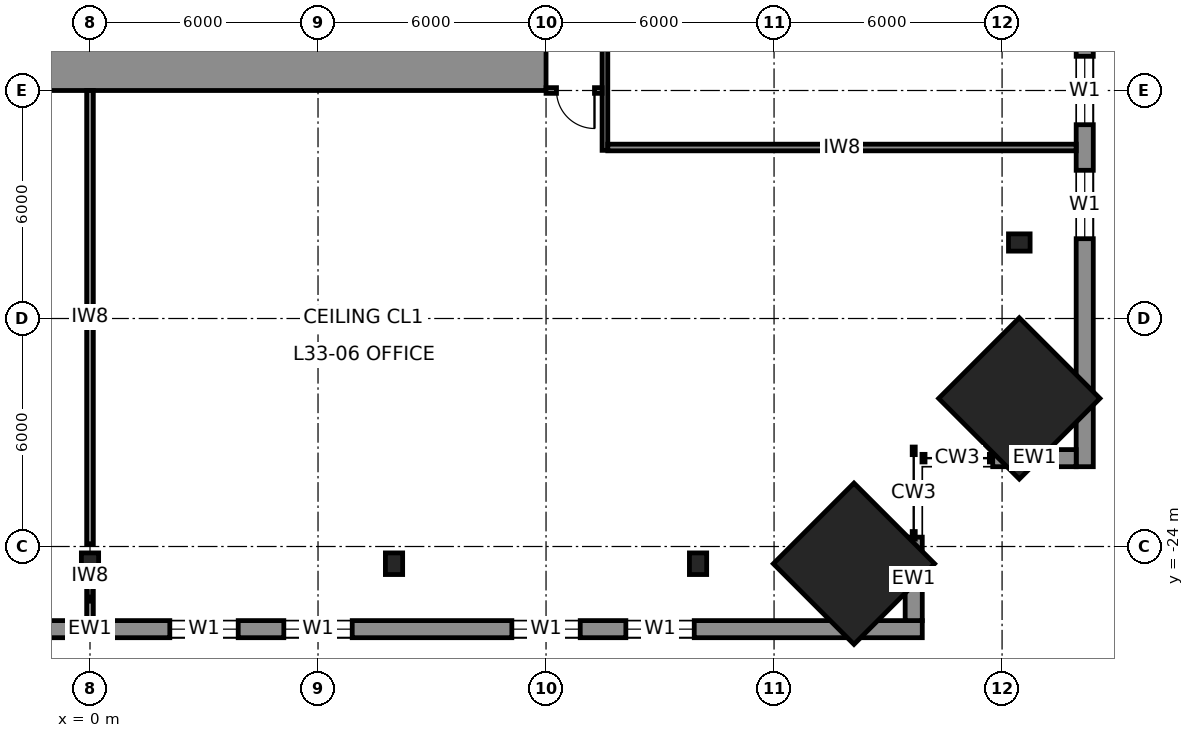
"""IFC4 building model, lengths in metres.
Left out: names, types, materials, properties, quantities, classifications, styles, units other than length and angle.
Written with IfcOpenShell. Run it as: python <this file> out.ifc"""

import sys

from ifc_helpers import new_model, si_unit, direction, frame, frame_2d, origin, origin_2d, place, context, subcontext, project, spatial, rectangle, i_section, extrude, element, fill, save


model = new_model("IFC4")
c1 = context("Model", 3, precision=1e-05, world=origin(), true_north=direction((0.0, 1.0)))
c2 = subcontext(c1, "Body", "Model", "MODEL_VIEW")
j1 = project(units=[si_unit("LENGTHUNIT", "METRE"), si_unit("PLANEANGLEUNIT", "RADIAN")], contexts=[c1])
p1 = place(None, origin())
s1 = spatial("IfcSite", under=j1, at=p1, CompositionType="ELEMENT")
p2 = place(p1, origin())
s2 = spatial("IfcBuilding", under=s1, at=p2, CompositionType="ELEMENT")
p3 = place(p2, frame((0.0, 0.0, 159.8)))
s3 = spatial("IfcBuildingStorey", under=s2, at=p3, CompositionType="ELEMENT", Elevation=159.8)
for number, where, z_axis, x_axis in (
    (1, (24.453, -20.103, 0.0), (-0.04, 0.04, 0.998), (-0.708, -0.707, 0.0)),
    (2, (20.103, -24.453, 0.0), (-0.04, 0.04, 0.998), (-0.707, -0.708, 0.0)),
):
    element("IfcColumn", number, at=place(p3, frame(where, z_axis=z_axis, x_axis=x_axis)), inside=s3, PredefinedType="COLUMN", context=c2, shape_type="SweptSolid", body=[
        extrude(rectangle(XDim=3.0, YDim=3.0, at=origin_2d()), origin(), (0.0, 0.0, 1.0), 4.007),
    ])
for number, where, z_axis, x_axis in (
    (3, (24.453, -16.0, 0.0), (-0.04, 0.0, 0.999), (0.0, -1.0, 0.0)),
    (4, (0.0, -24.453, 0.0), (0.0, 0.04, 0.999), (-1.0, 0.0, 0.0)),
    (5, (8.0, -24.453, 0.0), (0.0, 0.04, 0.999), (-1.0, 0.0, 0.0)),
    (6, (16.0, -24.453, 0.0), (0.0, 0.04, 0.999), (-1.0, 0.0, 0.0)),
):
    element("IfcColumn", number, at=place(p3, frame(where, z_axis=z_axis, x_axis=x_axis)), inside=s3, PredefinedType="COLUMN", context=c2, shape_type="SweptSolid", body=[
        extrude(i_section(OverallWidth=0.454, OverallDepth=0.569, WebThickness=0.078, FlangeThickness=0.125, at=origin_2d()), origin(), (0.0, 0.0, 1.0), 4.003),
    ])
p4 = place(p3, frame((12.0, -11.25, 0.0), z_axis=(0.0, 0.0, 1.0), x_axis=(-1.0, 0.0, 0.0)))
e7 = element("IfcWall", 7, at=p4, inside=s3, PredefinedType="SHEAR", context=c2, shape_type="SweptSolid", body=[
    extrude(rectangle(XDim=24.0, YDim=1.5, at=frame_2d((12.0, 0.0))), origin(), (0.0, 0.0, 1.0), 4.0),
])
p5 = place(p3, frame((26.175, -21.9, 0.0), z_axis=(0.0, 0.0, 1.0), x_axis=(0.0, 1.0, 0.0)))
e8 = element("IfcWall", 8, at=p5, inside=s3, PredefinedType="SOLIDWALL", context=c2, shape_type="SweptSolid", body=[
    extrude(rectangle(XDim=43.8, YDim=0.45, at=frame_2d((21.9, 0.0))), origin(), (0.0, 0.0, 1.0), 3.83),
])
p6 = place(p5, frame((6.0, 0.0, 0.7)))
e9 = element("IfcOpeningElement", 9, at=p6, cuts=e8, PredefinedType="OPENING", context=c2, shape_type="SweptSolid", body=[
    extrude(rectangle(XDim=1.8, YDim=2.6, at=frame_2d((0.9, 1.3))), frame((0.0, 0.235, 0.0), z_axis=(0.0, -1.0, 0.0), x_axis=(1.0, 0.0, 0.0)), (0.0, 0.0, 1.0), 0.47),
])
p7 = place(p5, frame((9.0, 0.0, 0.7)))
e10 = element("IfcOpeningElement", 10, at=p7, cuts=e8, PredefinedType="OPENING", context=c2, shape_type="SweptSolid", body=[
    extrude(rectangle(XDim=1.8, YDim=2.6, at=frame_2d((0.9, 1.3))), frame((0.0, 0.235, 0.0), z_axis=(0.0, -1.0, 0.0), x_axis=(1.0, 0.0, 0.0)), (0.0, 0.0, 1.0), 0.47),
])
p8 = place(p5, frame((15.0, 0.0, 0.7)))
e11 = element("IfcOpeningElement", 11, at=p8, cuts=e8, PredefinedType="OPENING", context=c2, shape_type="SweptSolid", body=[
    extrude(rectangle(XDim=1.8, YDim=2.6, at=frame_2d((0.9, 1.3))), frame((0.0, 0.235, 0.0), z_axis=(0.0, -1.0, 0.0), x_axis=(1.0, 0.0, 0.0)), (0.0, 0.0, 1.0), 0.47),
])
p9 = place(p5, frame((18.0, 0.0, 0.7)))
e12 = element("IfcOpeningElement", 12, at=p9, cuts=e8, PredefinedType="OPENING", context=c2, shape_type="SweptSolid", body=[
    extrude(rectangle(XDim=1.8, YDim=2.6, at=frame_2d((0.9, 1.3))), frame((0.0, 0.235, 0.0), z_axis=(0.0, -1.0, 0.0), x_axis=(1.0, 0.0, 0.0)), (0.0, 0.0, 1.0), 0.47),
])
p10 = place(p5, frame((24.0, 0.0, 0.7)))
e13 = element("IfcOpeningElement", 13, at=p10, cuts=e8, PredefinedType="OPENING", context=c2, shape_type="SweptSolid", body=[
    extrude(rectangle(XDim=1.8, YDim=2.6, at=frame_2d((0.9, 1.3))), frame((0.0, 0.235, 0.0), z_axis=(0.0, -1.0, 0.0), x_axis=(1.0, 0.0, 0.0)), (0.0, 0.0, 1.0), 0.47),
])
p11 = place(p5, frame((27.0, 0.0, 0.7)))
e14 = element("IfcOpeningElement", 14, at=p11, cuts=e8, PredefinedType="OPENING", context=c2, shape_type="SweptSolid", body=[
    extrude(rectangle(XDim=1.8, YDim=2.6, at=frame_2d((0.9, 1.3))), frame((0.0, 0.235, 0.0), z_axis=(0.0, -1.0, 0.0), x_axis=(1.0, 0.0, 0.0)), (0.0, 0.0, 1.0), 0.47),
])
p12 = place(p5, frame((33.0, 0.0, 0.7)))
e15 = element("IfcOpeningElement", 15, at=p12, cuts=e8, PredefinedType="OPENING", context=c2, shape_type="SweptSolid", body=[
    extrude(rectangle(XDim=1.8, YDim=2.6, at=frame_2d((0.9, 1.3))), frame((0.0, 0.235, 0.0), z_axis=(0.0, -1.0, 0.0), x_axis=(1.0, 0.0, 0.0)), (0.0, 0.0, 1.0), 0.47),
])
p13 = place(p5, frame((36.0, 0.0, 0.7)))
e16 = element("IfcOpeningElement", 16, at=p13, cuts=e8, PredefinedType="OPENING", context=c2, shape_type="SweptSolid", body=[
    extrude(rectangle(XDim=1.8, YDim=2.6, at=frame_2d((0.9, 1.3))), frame((0.0, 0.235, 0.0), z_axis=(0.0, -1.0, 0.0), x_axis=(1.0, 0.0, 0.0)), (0.0, 0.0, 1.0), 0.47),
])
p14 = place(p3, frame((-21.9, -26.175, 0.0), z_axis=(0.0, 0.0, 1.0), x_axis=(1.0, 0.0, 0.0)))
e17 = element("IfcWall", 17, at=p14, inside=s3, PredefinedType="SOLIDWALL", context=c2, shape_type="SweptSolid", body=[
    extrude(rectangle(XDim=43.8, YDim=0.45, at=frame_2d((21.9, 0.0))), origin(), (0.0, 0.0, 1.0), 3.83),
])
p15 = place(p14, frame((6.0, 0.0, 0.7)))
e18 = element("IfcOpeningElement", 18, at=p15, cuts=e17, PredefinedType="OPENING", context=c2, shape_type="SweptSolid", body=[
    extrude(rectangle(XDim=1.8, YDim=2.6, at=frame_2d((0.9, 1.3))), frame((0.0, 0.235, 0.0), z_axis=(0.0, -1.0, 0.0), x_axis=(1.0, 0.0, 0.0)), (0.0, 0.0, 1.0), 0.47),
])
p16 = place(p14, frame((9.0, 0.0, 0.7)))
e19 = element("IfcOpeningElement", 19, at=p16, cuts=e17, PredefinedType="OPENING", context=c2, shape_type="SweptSolid", body=[
    extrude(rectangle(XDim=1.8, YDim=2.6, at=frame_2d((0.9, 1.3))), frame((0.0, 0.235, 0.0), z_axis=(0.0, -1.0, 0.0), x_axis=(1.0, 0.0, 0.0)), (0.0, 0.0, 1.0), 0.47),
])
p17 = place(p14, frame((15.0, 0.0, 0.7)))
e20 = element("IfcOpeningElement", 20, at=p17, cuts=e17, PredefinedType="OPENING", context=c2, shape_type="SweptSolid", body=[
    extrude(rectangle(XDim=1.8, YDim=2.6, at=frame_2d((0.9, 1.3))), frame((0.0, 0.235, 0.0), z_axis=(0.0, -1.0, 0.0), x_axis=(1.0, 0.0, 0.0)), (0.0, 0.0, 1.0), 0.47),
])
p18 = place(p14, frame((18.0, 0.0, 0.7)))
e21 = element("IfcOpeningElement", 21, at=p18, cuts=e17, PredefinedType="OPENING", context=c2, shape_type="SweptSolid", body=[
    extrude(rectangle(XDim=1.8, YDim=2.6, at=frame_2d((0.9, 1.3))), frame((0.0, 0.235, 0.0), z_axis=(0.0, -1.0, 0.0), x_axis=(1.0, 0.0, 0.0)), (0.0, 0.0, 1.0), 0.47),
])
p19 = place(p14, frame((24.0, 0.0, 0.7)))
e22 = element("IfcOpeningElement", 22, at=p19, cuts=e17, PredefinedType="OPENING", context=c2, shape_type="SweptSolid", body=[
    extrude(rectangle(XDim=1.8, YDim=2.6, at=frame_2d((0.9, 1.3))), frame((0.0, 0.235, 0.0), z_axis=(0.0, -1.0, 0.0), x_axis=(1.0, 0.0, 0.0)), (0.0, 0.0, 1.0), 0.47),
])
p20 = place(p14, frame((27.0, 0.0, 0.7)))
e23 = element("IfcOpeningElement", 23, at=p20, cuts=e17, PredefinedType="OPENING", context=c2, shape_type="SweptSolid", body=[
    extrude(rectangle(XDim=1.8, YDim=2.6, at=frame_2d((0.9, 1.3))), frame((0.0, 0.235, 0.0), z_axis=(0.0, -1.0, 0.0), x_axis=(1.0, 0.0, 0.0)), (0.0, 0.0, 1.0), 0.47),
])
p21 = place(p14, frame((33.0, 0.0, 0.7)))
e24 = element("IfcOpeningElement", 24, at=p21, cuts=e17, PredefinedType="OPENING", context=c2, shape_type="SweptSolid", body=[
    extrude(rectangle(XDim=1.8, YDim=2.6, at=frame_2d((0.9, 1.3))), frame((0.0, 0.235, 0.0), z_axis=(0.0, -1.0, 0.0), x_axis=(1.0, 0.0, 0.0)), (0.0, 0.0, 1.0), 0.47),
])
p22 = place(p14, frame((36.0, 0.0, 0.7)))
e25 = element("IfcOpeningElement", 25, at=p22, cuts=e17, PredefinedType="OPENING", context=c2, shape_type="SweptSolid", body=[
    extrude(rectangle(XDim=1.8, YDim=2.6, at=frame_2d((0.9, 1.3))), frame((0.0, 0.235, 0.0), z_axis=(0.0, -1.0, 0.0), x_axis=(1.0, 0.0, 0.0)), (0.0, 0.0, 1.0), 0.47),
])
for number, where, z_axis, x_axis in (
    (26, (21.675, -23.754, 0.0), (0.0, 0.0, 1.0), (0.0, -1.0, 0.0)),
    (27, (23.754, -21.675, 0.0), (0.0, 0.0, 1.0), (1.0, 0.0, 0.0)),
):
    element("IfcWall", number, at=place(p3, frame(where, z_axis=z_axis, x_axis=x_axis)), inside=s3, PredefinedType="SOLIDWALL", context=c2, shape_type="SweptSolid", body=[
        extrude(rectangle(XDim=2.196, YDim=0.45, at=frame_2d((1.098, 0.0))), origin(), (0.0, 0.0, 1.0), 3.83),
    ])
p23 = place(p3, frame((13.55, -13.575, 0.0), z_axis=(0.0, 0.0, 1.0), x_axis=(0.0, 1.0, 0.0)))
e28 = element("IfcWall", 28, at=p23, inside=s3, PredefinedType="PARTITIONING", context=c2, shape_type="SweptSolid", body=[
    extrude(rectangle(XDim=27.05, YDim=0.15, at=frame_2d((13.525, 0.0))), origin(), (0.0, 0.0, 1.0), 3.83),
])
p24 = place(p23, frame((6.975, 0.0, 0.0)))
e29 = element("IfcOpeningElement", 29, at=p24, cuts=e28, PredefinedType="OPENING", context=c2, shape_type="SweptSolid", body=[
    extrude(rectangle(XDim=1.4, YDim=2.3, at=frame_2d((0.7, 1.15))), frame((0.0, 0.085, 0.0), z_axis=(0.0, -1.0, 0.0), x_axis=(1.0, 0.0, 0.0)), (0.0, 0.0, 1.0), 0.17),
])
p25 = place(p23, frame((19.775, 0.0, 0.0)))
e30 = element("IfcOpeningElement", 30, at=p25, cuts=e28, PredefinedType="OPENING", context=c2, shape_type="SweptSolid", body=[
    extrude(rectangle(XDim=1.0, YDim=2.3, at=frame_2d((0.5, 1.15))), frame((0.0, 0.085, 0.0), z_axis=(0.0, -1.0, 0.0), x_axis=(1.0, 0.0, 0.0)), (0.0, 0.0, 1.0), 0.17),
])
p26 = place(p23, frame((23.775, 0.0, 0.0)))
e31 = element("IfcOpeningElement", 31, at=p26, cuts=e28, PredefinedType="OPENING", context=c2, shape_type="SweptSolid", body=[
    extrude(rectangle(XDim=1.0, YDim=2.3, at=frame_2d((0.5, 1.15))), frame((0.0, 0.085, 0.0), z_axis=(0.0, -1.0, 0.0), x_axis=(1.0, 0.0, 0.0)), (0.0, 0.0, 1.0), 0.17),
])
p27 = place(p23, frame((16.825, 0.0, 0.0)))
e32 = element("IfcOpeningElement", 32, at=p27, cuts=e28, PredefinedType="OPENING", context=c2, shape_type="SweptSolid", body=[
    extrude(rectangle(XDim=1.0, YDim=2.3, at=frame_2d((0.5, 1.15))), frame((0.0, 0.085, 0.0), z_axis=(0.0, -1.0, 0.0), x_axis=(1.0, 0.0, 0.0)), (0.0, 0.0, 1.0), 0.17),
])
p28 = place(p3, frame((13.475, -12.0, 0.0), z_axis=(0.0, 0.0, 1.0), x_axis=(-1.0, 0.0, 0.0)))
e33 = element("IfcWall", 33, at=p28, inside=s3, PredefinedType="PARTITIONING", context=c2, shape_type="SweptSolid", body=[
    extrude(rectangle(XDim=1.475, YDim=0.15, at=frame_2d((0.738, 0.0))), origin(), (0.0, 0.0, 1.0), 3.83),
])
p29 = place(p28, frame((0.2, 0.0, 0.0)))
e34 = element("IfcOpeningElement", 34, at=p29, cuts=e33, PredefinedType="OPENING", context=c2, shape_type="SweptSolid", body=[
    extrude(rectangle(XDim=1.0, YDim=2.3, at=frame_2d((0.5, 1.15))), frame((0.0, 0.085, 0.0), z_axis=(0.0, -1.0, 0.0), x_axis=(1.0, 0.0, 0.0)), (0.0, 0.0, 1.0), 0.17),
])
p30 = place(p3, frame((25.95, -13.5, 0.0), z_axis=(0.0, 0.0, 1.0), x_axis=(-1.0, 0.0, 0.0)))
e35 = element("IfcWall", 35, at=p30, inside=s3, PredefinedType="PARTITIONING", context=c2, shape_type="SweptSolid", body=[
    extrude(rectangle(XDim=12.325, YDim=0.175, at=frame_2d((6.163, 0.0))), origin(), (0.0, 0.0, 1.0), 3.83),
])
p31 = place(p3, frame((0.0, -12.0, 0.0), z_axis=(0.0, 0.0, 1.0), x_axis=(0.0, -1.0, 0.0)))
e36 = element("IfcWall", 36, at=p31, inside=s3, PredefinedType="PARTITIONING", context=c2, shape_type="SweptSolid", body=[
    extrude(rectangle(XDim=11.928, YDim=0.175, at=frame_2d((5.964, 0.0))), origin(), (0.0, 0.0, 1.0), 2.84),
])
p32 = place(p3, frame((0.0, -24.817, 0.0), z_axis=(0.0, 0.0, 1.0), x_axis=(0.0, -1.0, 0.0)))
e37 = element("IfcWall", 37, at=p32, inside=s3, PredefinedType="PARTITIONING", context=c2, shape_type="SweptSolid", body=[
    extrude(rectangle(XDim=1.133, YDim=0.175, at=frame_2d((0.566, 0.0))), origin(), (0.0, 0.0, 1.0), 3.83),
])
p33 = place(p6, origin())
e38 = element("IfcWindow", 38, at=p33, inside=s3, PartitioningType="SINGLE_PANEL", PredefinedType="WINDOW", context=c2, shape_type="SweptSolid", body=[
    extrude(rectangle(XDim=1.8, YDim=2.6, at=frame_2d((0.9, 1.3))), frame((0.0, 0.03, 0.0), z_axis=(0.0, -1.0, 0.0), x_axis=(1.0, 0.0, 0.0)), (0.0, 0.0, 1.0), 0.06),
])
fill(e9, e38)
p34 = place(p7, origin())
e39 = element("IfcWindow", 39, at=p34, inside=s3, PartitioningType="SINGLE_PANEL", PredefinedType="WINDOW", context=c2, shape_type="SweptSolid", body=[
    extrude(rectangle(XDim=1.8, YDim=2.6, at=frame_2d((0.9, 1.3))), frame((0.0, 0.03, 0.0), z_axis=(0.0, -1.0, 0.0), x_axis=(1.0, 0.0, 0.0)), (0.0, 0.0, 1.0), 0.06),
])
fill(e10, e39)
p35 = place(p19, origin())
e40 = element("IfcWindow", 40, at=p35, inside=s3, PartitioningType="SINGLE_PANEL", PredefinedType="WINDOW", context=c2, shape_type="SweptSolid", body=[
    extrude(rectangle(XDim=1.8, YDim=2.6, at=frame_2d((0.9, 1.3))), frame((0.0, 0.03, 0.0), z_axis=(0.0, -1.0, 0.0), x_axis=(1.0, 0.0, 0.0)), (0.0, 0.0, 1.0), 0.06),
])
fill(e22, e40)
p36 = place(p20, origin())
e41 = element("IfcWindow", 41, at=p36, inside=s3, PartitioningType="SINGLE_PANEL", PredefinedType="WINDOW", context=c2, shape_type="SweptSolid", body=[
    extrude(rectangle(XDim=1.8, YDim=2.6, at=frame_2d((0.9, 1.3))), frame((0.0, 0.03, 0.0), z_axis=(0.0, -1.0, 0.0), x_axis=(1.0, 0.0, 0.0)), (0.0, 0.0, 1.0), 0.06),
])
fill(e23, e41)
p37 = place(p21, origin())
e42 = element("IfcWindow", 42, at=p37, inside=s3, PartitioningType="SINGLE_PANEL", PredefinedType="WINDOW", context=c2, shape_type="SweptSolid", body=[
    extrude(rectangle(XDim=1.8, YDim=2.6, at=frame_2d((0.9, 1.3))), frame((0.0, 0.03, 0.0), z_axis=(0.0, -1.0, 0.0), x_axis=(1.0, 0.0, 0.0)), (0.0, 0.0, 1.0), 0.06),
])
fill(e24, e42)
p38 = place(p22, origin())
e43 = element("IfcWindow", 43, at=p38, inside=s3, PartitioningType="SINGLE_PANEL", PredefinedType="WINDOW", context=c2, shape_type="SweptSolid", body=[
    extrude(rectangle(XDim=1.8, YDim=2.6, at=frame_2d((0.9, 1.3))), frame((0.0, 0.03, 0.0), z_axis=(0.0, -1.0, 0.0), x_axis=(1.0, 0.0, 0.0)), (0.0, 0.0, 1.0), 0.06),
])
fill(e25, e43)
p39 = place(p29, origin())
e44 = element("IfcDoor", 44, at=p39, inside=s3, OperationType="SINGLE_SWING_LEFT", PredefinedType="DOOR", context=c2, shape_type="SweptSolid", body=[
    extrude(rectangle(XDim=1.0, YDim=2.3, at=frame_2d((0.5, 1.15))), frame((0.0, 0.025, 0.0), z_axis=(0.0, -1.0, 0.0), x_axis=(1.0, 0.0, 0.0)), (0.0, 0.0, 1.0), 0.05),
])
fill(e34, e44)
save(model, sys.argv[1])
